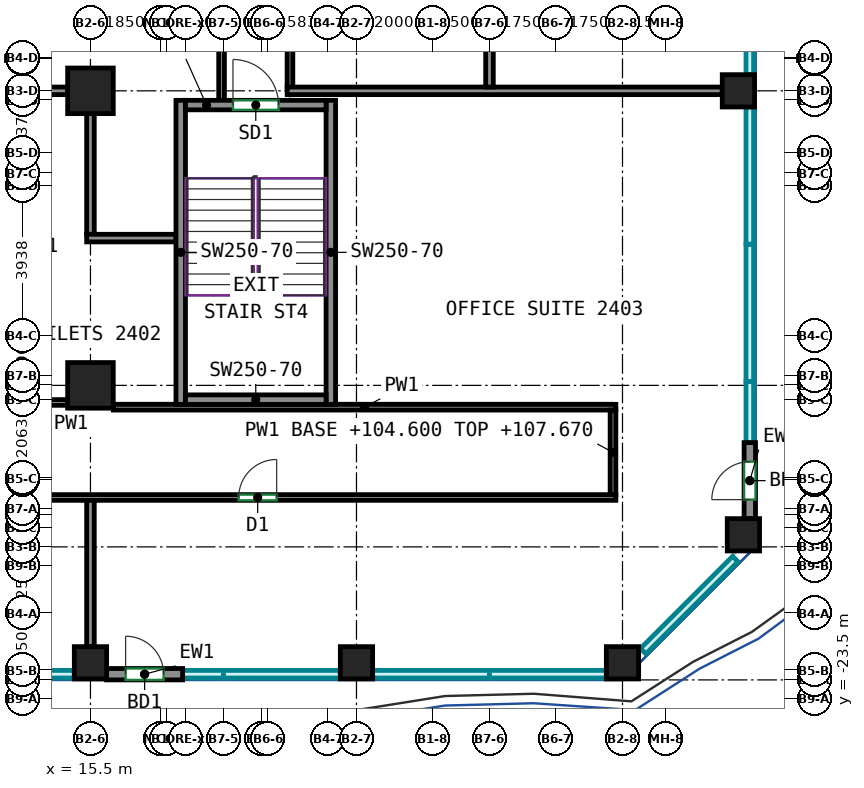
"""IFC4 building model, lengths in metres.
Left out: names, types, materials, properties, quantities, classifications, styles, units other than length and angle.
Written with IfcOpenShell. Run it as: python <this file> out.ifc"""

import sys

from ifc_helpers import new_model, si_unit, direction, frame, frame_2d, origin, origin_2d, place, context, subcontext, project, spatial, rectangle, extrude, source, transform, mapped, element, fill, save


model = new_model("IFC4")
c1 = context("Model", 3, precision=1e-05, world=origin(), true_north=direction((0.0, 1.0)))
c2 = subcontext(c1, "Body", "Model", "MODEL_VIEW")
j1 = project(units=[si_unit("LENGTHUNIT", "METRE"), si_unit("PLANEANGLEUNIT", "RADIAN")], contexts=[c1])
p1 = place(None, origin())
s1 = spatial("IfcSite", under=j1, at=p1, CompositionType="ELEMENT")
p2 = place(p1, origin())
s2 = spatial("IfcBuilding", under=s1, at=p2, CompositionType="ELEMENT")
p3 = place(p2, frame((0.0, 0.0, 104.6)))
s3 = spatial("IfcBuildingStorey", under=s2, at=p3, CompositionType="ELEMENT", Elevation=104.6)
m1 = source(origin(), c2, "Body", "SweptSolid", [
    extrude(rectangle(XDim=0.85, YDim=0.85, at=origin_2d()), origin(), (0.0, 0.0, 1.0), 3.72),
])
p4 = place(p3, frame((15.5, -22.55, 0.0), z_axis=(0.0, 0.0, 1.0), x_axis=(1.0, 0.0, 0.0)))
e1 = element("IfcColumn", 1, at=p4, inside=s3, PredefinedType="COLUMN", context=c2, shape_type="MappedRepresentation", body=[
    mapped(m1, transform((0.0, 0.0, 0.0))),
])
m2 = source(origin(), c2, "Body", "SweptSolid", [
    extrude(rectangle(XDim=1.2, YDim=1.2, at=origin_2d()), origin(), (0.0, 0.0, 1.0), 3.72),
])
for number, where, z_axis, x_axis in (
    (2, (15.5, -15.25, 0.0), (0.0, 0.0, 1.0), (1.0, 0.0, 0.0)),
    (3, (15.5, -7.5, 0.0), (0.0, 0.0, 1.0), (1.0, 0.0, 0.0)),
):
    element("IfcColumn", number, at=place(p3, frame(where, z_axis=z_axis, x_axis=x_axis)), inside=s3, PredefinedType="COLUMN", context=c2, shape_type="MappedRepresentation", body=[
        mapped(m2, transform((0.0, 0.0, 0.0))),
    ])
for number, where, z_axis, x_axis in (
    (4, (22.5, -22.55, 0.0), (0.0, 0.0, 1.0), (1.0, 0.0, 0.0)),
    (5, (29.5, -22.55, 0.0), (0.0, 0.0, 1.0), (1.0, 0.0, 0.0)),
    (6, (32.55, -7.5, 0.0), (0.0, 0.0, 1.0), (1.0, 0.0, 0.0)),
    (7, (32.682, -19.182, 0.0), (0.0, 0.0, 1.0), (1.0, 0.0, 0.0)),
):
    element("IfcColumn", number, at=place(p3, frame(where, z_axis=z_axis, x_axis=x_axis)), inside=s3, PredefinedType="COLUMN", context=c2, shape_type="MappedRepresentation", body=[
        mapped(m1, transform((0.0, 0.0, 0.0))),
    ])
m3 = source(origin(), c2, "Body", "SweptSolid", [
    extrude(rectangle(XDim=8.0, YDim=0.25, at=frame_2d((4.0, 0.0))), origin(), (0.0, 0.0, 1.0), 3.72),
])
for number, where, z_axis, x_axis in (
    (8, (17.875, -15.75, 0.0), (0.0, 0.0, 1.0), (0.0, 1.0, 0.0)),
    (9, (21.825, -15.75, 0.0), (0.0, 0.0, 1.0), (0.0, 1.0, 0.0)),
):
    element("IfcWall", number, at=place(p3, frame(where, z_axis=z_axis, x_axis=x_axis)), inside=s3, PredefinedType="SHEAR", context=c2, shape_type="MappedRepresentation", body=[
        mapped(m3, transform((0.0, 0.0, 0.0))),
    ])
m4 = source(origin(), c2, "Body", "SweptSolid", [
    extrude(rectangle(XDim=3.7, YDim=0.25, at=frame_2d((1.85, 0.0))), origin(), (0.0, 0.0, 1.0), 3.72),
])
p5 = place(p3, frame((18.0, -15.625, 0.0), z_axis=(0.0, 0.0, 1.0), x_axis=(1.0, 0.0, 0.0)))
e10 = element("IfcWall", 10, at=p5, inside=s3, PredefinedType="SHEAR", context=c2, shape_type="MappedRepresentation", body=[
    mapped(m4, transform((0.0, 0.0, 0.0))),
])
p6 = place(p3, frame((18.0, -7.875, 0.0), z_axis=(0.0, 0.0, 1.0), x_axis=(1.0, 0.0, 0.0)))
e11 = element("IfcWall", 11, at=p6, inside=s3, PredefinedType="SHEAR", context=c2, shape_type="MappedRepresentation", body=[
    mapped(m4, transform((0.0, 0.0, 0.0))),
])
p7 = place(p6, frame((1.25, 0.0, 0.0)))
e12 = element("IfcOpeningElement", 12, at=p7, cuts=e11, PredefinedType="OPENING", context=c2, shape_type="SweptSolid", body=[
    extrude(rectangle(XDim=1.2, YDim=2.1, at=frame_2d((0.6, 1.05))), frame((0.0, 0.135, 0.0), z_axis=(0.0, -1.0, 0.0), x_axis=(1.0, 0.0, 0.0)), (0.0, 0.0, 1.0), 0.27),
])
m5 = source(origin(), c2, "Body", "SweptSolid", [
    extrude(rectangle(XDim=2.0, YDim=0.3, at=frame_2d((1.0, 0.0))), origin(), (0.0, 0.0, 1.0), 3.72),
])
p8 = place(p3, frame((15.925, -22.85, 0.0), z_axis=(0.0, 0.0, 1.0), x_axis=(1.0, 0.0, 0.0)))
e13 = element("IfcWall", 13, at=p8, inside=s3, PredefinedType="SOLIDWALL", context=c2, shape_type="MappedRepresentation", body=[
    mapped(m5, transform((0.0, 0.0, 0.0))),
])
p9 = place(p8, frame((0.5, 0.0, 0.0)))
e14 = element("IfcOpeningElement", 14, at=p9, cuts=e13, PredefinedType="OPENING", context=c2, shape_type="SweptSolid", body=[
    extrude(rectangle(XDim=1.0, YDim=2.1, at=frame_2d((0.5, 1.05))), frame((0.0, 0.16, 0.0), z_axis=(0.0, -1.0, 0.0), x_axis=(1.0, 0.0, 0.0)), (0.0, 0.0, 1.0), 0.32),
])
p10 = place(p3, frame((32.85, -18.757, 0.0), z_axis=(0.0, 0.0, 1.0), x_axis=(0.0, 1.0, 0.0)))
e15 = element("IfcWall", 15, at=p10, inside=s3, PredefinedType="SOLIDWALL", context=c2, shape_type="MappedRepresentation", body=[
    mapped(m5, transform((0.0, 0.0, 0.0))),
])
p11 = place(p10, frame((0.5, 0.0, 0.0)))
e16 = element("IfcOpeningElement", 16, at=p11, cuts=e15, PredefinedType="OPENING", context=c2, shape_type="SweptSolid", body=[
    extrude(rectangle(XDim=1.0, YDim=2.1, at=frame_2d((0.5, 1.05))), frame((0.0, 0.16, 0.0), z_axis=(0.0, -1.0, 0.0), x_axis=(1.0, 0.0, 0.0)), (0.0, 0.0, 1.0), 0.32),
])
p12 = place(p3, frame((-19.325, -18.2, 0.0), z_axis=(0.0, 0.0, 1.0), x_axis=(1.0, 0.0, 0.0)))
e17 = element("IfcWall", 17, at=p12, inside=s3, PredefinedType="PARTITIONING", context=c2, shape_type="SweptSolid", body=[
    extrude(rectangle(XDim=48.65, YDim=0.15, at=frame_2d((24.325, 0.0))), origin(), (0.0, 0.0, 1.0), 3.72),
])
p13 = place(p12, frame((6.208, 0.0, 0.0)))
e18 = element("IfcOpeningElement", 18, at=p13, cuts=e17, PredefinedType="OPENING", context=c2, shape_type="SweptSolid", body=[
    extrude(rectangle(XDim=1.8, YDim=2.1, at=frame_2d((0.9, 1.05))), frame((0.0, 0.085, 0.0), z_axis=(0.0, -1.0, 0.0), x_axis=(1.0, 0.0, 0.0)), (0.0, 0.0, 1.0), 0.17),
])
p14 = place(p12, frame((29.32, 0.0, 0.0)))
e19 = element("IfcOpeningElement", 19, at=p14, cuts=e17, PredefinedType="OPENING", context=c2, shape_type="SweptSolid", body=[
    extrude(rectangle(XDim=0.9, YDim=2.1, at=frame_2d((0.45, 1.05))), frame((0.0, 0.085, 0.0), z_axis=(0.0, -1.0, 0.0), x_axis=(1.0, 0.0, 0.0)), (0.0, 0.0, 1.0), 0.17),
])
p15 = place(p12, frame((38.725, 0.0, 0.0)))
e20 = element("IfcOpeningElement", 20, at=p15, cuts=e17, PredefinedType="OPENING", context=c2, shape_type="SweptSolid", body=[
    extrude(rectangle(XDim=1.0, YDim=2.1, at=frame_2d((0.5, 1.05))), frame((0.0, 0.085, 0.0), z_axis=(0.0, -1.0, 0.0), x_axis=(1.0, 0.0, 0.0)), (0.0, 0.0, 1.0), 0.17),
])
p16 = place(p3, frame((13.125, -15.7, 0.0), z_axis=(0.0, 0.0, 1.0), x_axis=(1.0, 0.0, 0.0)))
e21 = element("IfcWall", 21, at=p16, inside=s3, PredefinedType="PARTITIONING", context=c2, shape_type="SweptSolid", body=[
    extrude(rectangle(XDim=1.775, YDim=0.15, at=frame_2d((0.887, 0.0))), origin(), (0.0, 0.0, 1.0), 3.72),
])
p17 = place(p3, frame((16.1, -15.825, 0.0), z_axis=(0.0, 0.0, 1.0), x_axis=(1.0, 0.0, 0.0)))
e22 = element("IfcWall", 22, at=p17, inside=s3, PredefinedType="PARTITIONING", context=c2, shape_type="SweptSolid", body=[
    extrude(rectangle(XDim=13.225, YDim=0.15, at=frame_2d((6.612, 0.0))), origin(), (0.0, 0.0, 1.0), 3.72),
])
p18 = place(p3, frame((29.25, -18.125, 0.0), z_axis=(0.0, 0.0, 1.0), x_axis=(0.0, 1.0, 0.0)))
e23 = element("IfcWall", 23, at=p18, inside=s3, PredefinedType="PARTITIONING", context=c2, shape_type="SweptSolid", body=[
    extrude(rectangle(XDim=2.225, YDim=0.15, at=frame_2d((1.113, 0.0))), origin(), (0.0, 0.0, 1.0), 3.07),
])
p19 = place(p3, frame((18.95, 4.05, 0.0), z_axis=(0.0, 0.0, 1.0), x_axis=(0.0, -1.0, 0.0)))
e24 = element("IfcWall", 24, at=p19, inside=s3, PredefinedType="PARTITIONING", context=c2, shape_type="SweptSolid", body=[
    extrude(rectangle(XDim=11.8, YDim=0.15, at=frame_2d((5.9, 0.0))), origin(), (0.0, 0.0, 1.0), 3.72),
])
p20 = place(p19, frame((0.4, 0.0, 0.0)))
e25 = element("IfcOpeningElement", 25, at=p20, cuts=e24, PredefinedType="OPENING", context=c2, shape_type="SweptSolid", body=[
    extrude(rectangle(XDim=0.9, YDim=2.1, at=frame_2d((0.45, 1.05))), frame((0.0, 0.085, 0.0), z_axis=(0.0, -1.0, 0.0), x_axis=(1.0, 0.0, 0.0)), (0.0, 0.0, 1.0), 0.17),
])
p21 = place(p3, frame((20.75, -7.41, 0.0), z_axis=(0.0, 0.0, 1.0), x_axis=(0.0, 1.0, 0.0)))
e26 = element("IfcWall", 26, at=p21, inside=s3, PredefinedType="PARTITIONING", context=c2, shape_type="SweptSolid", body=[
    extrude(rectangle(XDim=7.57, YDim=0.15, at=frame_2d((3.785, 0.0))), origin(), (0.0, 0.0, 1.0), 3.72),
])
p22 = place(p21, frame((5.56, 0.0, 0.0)))
e27 = element("IfcOpeningElement", 27, at=p22, cuts=e26, PredefinedType="OPENING", context=c2, shape_type="SweptSolid", body=[
    extrude(rectangle(XDim=0.9, YDim=2.1, at=frame_2d((0.45, 1.05))), frame((0.0, 0.085, 0.0), z_axis=(0.0, -1.0, 0.0), x_axis=(1.0, 0.0, 0.0)), (0.0, 0.0, 1.0), 0.17),
])
p23 = place(p3, frame((15.5, -22.125, 0.0), z_axis=(0.0, 0.0, 1.0), x_axis=(0.0, 1.0, 0.0)))
e28 = element("IfcWall", 28, at=p23, inside=s3, PredefinedType="PARTITIONING", context=c2, shape_type="SweptSolid", body=[
    extrude(rectangle(XDim=3.849, YDim=0.2, at=frame_2d((1.925, 0.0))), origin(), (0.0, 0.0, 1.0), 3.72),
])
p24 = place(p3, frame((13.126, -7.5, 0.0), z_axis=(0.0, 0.0, 1.0), x_axis=(1.0, 0.0, 0.0)))
e29 = element("IfcWall", 29, at=p24, inside=s3, PredefinedType="PARTITIONING", context=c2, shape_type="SweptSolid", body=[
    extrude(rectangle(XDim=1.774, YDim=0.2, at=frame_2d((0.887, 0.0))), origin(), (0.0, 0.0, 1.0), 3.07),
])
p25 = place(p3, frame((15.5, -11.275, 0.0), z_axis=(0.0, 0.0, 1.0), x_axis=(0.0, 1.0, 0.0)))
e30 = element("IfcWall", 30, at=p25, inside=s3, PredefinedType="PARTITIONING", context=c2, shape_type="SweptSolid", body=[
    extrude(rectangle(XDim=3.175, YDim=0.2, at=frame_2d((1.587, 0.0))), origin(), (0.0, 0.0, 1.0), 3.72),
])
p26 = place(p3, frame((17.75, -11.375, 0.0), z_axis=(0.0, 0.0, 1.0), x_axis=(-1.0, 0.0, 0.0)))
e31 = element("IfcWall", 31, at=p26, inside=s3, PredefinedType="PARTITIONING", context=c2, shape_type="SweptSolid", body=[
    extrude(rectangle(XDim=2.35, YDim=0.2, at=frame_2d((1.175, 0.0))), origin(), (0.0, 0.0, 1.0), 3.72),
])
p27 = place(p3, frame((20.676, -7.5, 0.0), z_axis=(0.0, 0.0, 1.0), x_axis=(1.0, 0.0, 0.0)))
e32 = element("IfcWall", 32, at=p27, inside=s3, PredefinedType="PARTITIONING", context=c2, shape_type="SweptSolid", body=[
    extrude(rectangle(XDim=11.449, YDim=0.2, at=frame_2d((5.725, 0.0))), origin(), (0.0, 0.0, 1.0), 3.72),
])
p28 = place(p3, frame((26.0, -7.4, 0.0), z_axis=(0.0, 0.0, 1.0), x_axis=(0.0, 1.0, 0.0)))
e33 = element("IfcWall", 33, at=p28, inside=s3, PredefinedType="PARTITIONING", context=c2, shape_type="SweptSolid", body=[
    extrude(rectangle(XDim=7.55, YDim=0.2, at=frame_2d((3.775, 0.0))), origin(), (0.0, 0.0, 1.0), 3.72),
])
p29 = place(p9, origin())
e34 = element("IfcDoor", 34, at=p29, inside=s3, OperationType="SINGLE_SWING_LEFT", PredefinedType="DOOR", context=c2, shape_type="SweptSolid", body=[
    extrude(rectangle(XDim=1.0, YDim=2.1, at=frame_2d((0.5, 1.05))), frame((0.0, 0.025, 0.0), z_axis=(0.0, -1.0, 0.0), x_axis=(1.0, 0.0, 0.0)), (0.0, 0.0, 1.0), 0.05),
])
fill(e14, e34)
p30 = place(p11, origin())
e35 = element("IfcDoor", 35, at=p30, inside=s3, OperationType="SINGLE_SWING_LEFT", PredefinedType="DOOR", context=c2, shape_type="SweptSolid", body=[
    extrude(rectangle(XDim=1.0, YDim=2.1, at=frame_2d((0.5, 1.05))), frame((0.0, 0.025, 0.0), z_axis=(0.0, -1.0, 0.0), x_axis=(1.0, 0.0, 0.0)), (0.0, 0.0, 1.0), 0.05),
])
fill(e16, e35)
p31 = place(p7, origin())
e36 = element("IfcDoor", 36, at=p31, inside=s3, OperationType="DOUBLE_DOOR_SINGLE_SWING", PredefinedType="DOOR", context=c2, shape_type="SweptSolid", body=[
    extrude(rectangle(XDim=1.2, YDim=2.1, at=frame_2d((0.6, 1.05))), frame((0.0, 0.025, 0.0), z_axis=(0.0, -1.0, 0.0), x_axis=(1.0, 0.0, 0.0)), (0.0, 0.0, 1.0), 0.05),
])
fill(e12, e36)
p32 = place(p15, origin())
e37 = element("IfcDoor", 37, at=p32, inside=s3, OperationType="SINGLE_SWING_RIGHT", PredefinedType="DOOR", context=c2, shape_type="SweptSolid", body=[
    extrude(rectangle(XDim=1.0, YDim=2.1, at=frame_2d((0.5, 1.05))), frame((0.0, 0.025, 0.0), z_axis=(0.0, -1.0, 0.0), x_axis=(1.0, 0.0, 0.0)), (0.0, 0.0, 1.0), 0.05),
])
fill(e20, e37)
save(model, sys.argv[1])
